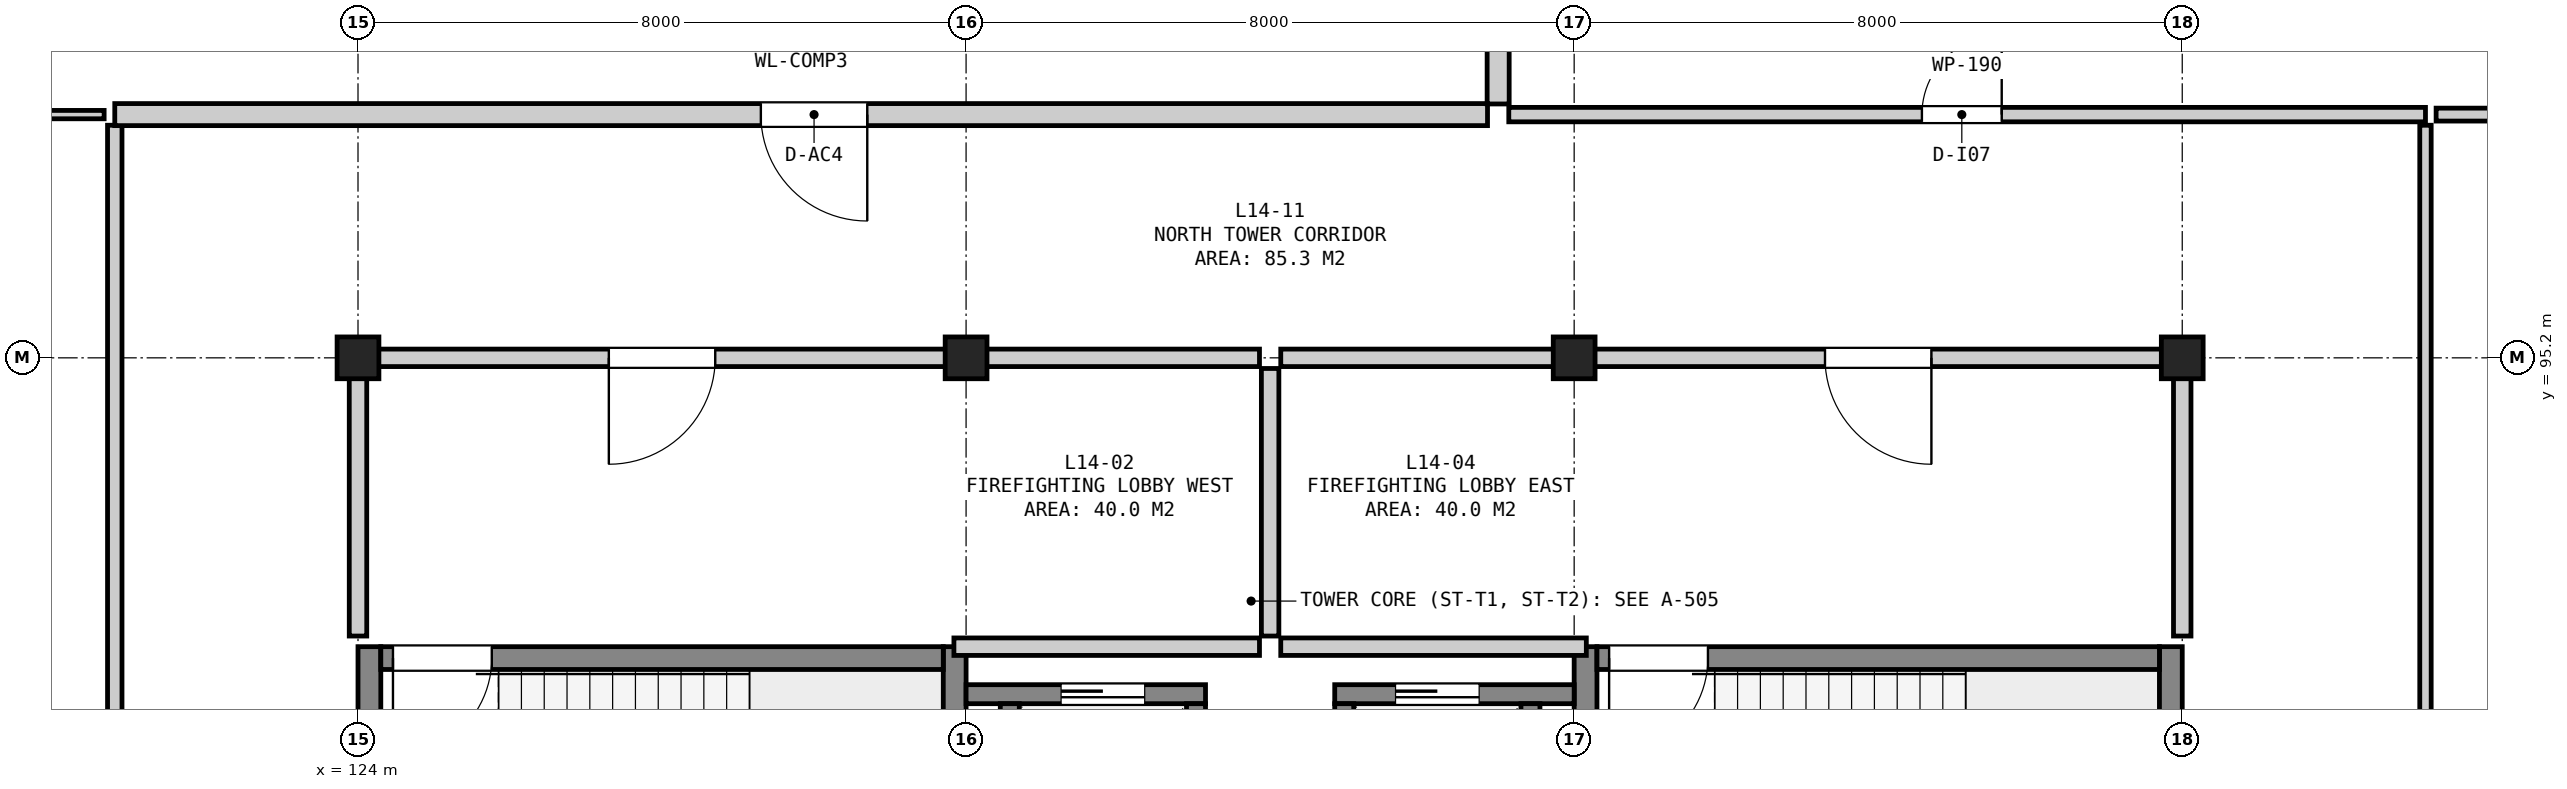
"""IFC4 building model, lengths in metres.
Left out: names, types, materials, properties, quantities, classifications, styles, units other than length and angle.
Written with IfcOpenShell. Run it as: python <this file> out.ifc"""

import sys

from ifc_helpers import new_model, si_unit, direction, frame, frame_2d, origin, origin_2d, place, context, subcontext, project, spatial, rectangle, extrude, element, fill, save


model = new_model("IFC4")
c1 = context("Model", 3, precision=1e-05, world=origin(), true_north=direction((0.0, 1.0)))
c2 = subcontext(c1, "Body", "Model", "MODEL_VIEW")
j1 = project(units=[si_unit("LENGTHUNIT", "METRE"), si_unit("PLANEANGLEUNIT", "RADIAN")], contexts=[c1])
p1 = place(None, origin())
s1 = spatial("IfcSite", under=j1, at=p1, CompositionType="ELEMENT")
p2 = place(p1, origin())
s2 = spatial("IfcBuilding", under=s1, at=p2, CompositionType="ELEMENT")
p3 = place(p2, frame((0.0, 0.0, 58.7)))
s3 = spatial("IfcBuildingStorey", under=s2, at=p3, CompositionType="ELEMENT", Elevation=58.7)
for number, where, z_axis, x_axis in (
    (1, (124.0, 95.2, 0.0), (0.0, 0.0, 1.0), (1.0, 0.0, 0.0)),
    (2, (132.0, 95.2, 0.0), (0.0, 0.0, 1.0), (1.0, 0.0, 0.0)),
    (3, (140.0, 95.2, 0.0), (0.0, 0.0, 1.0), (1.0, 0.0, 0.0)),
    (4, (148.0, 95.2, 0.0), (0.0, 0.0, 1.0), (1.0, 0.0, 0.0)),
):
    element("IfcColumn", number, at=place(p3, frame(where, z_axis=z_axis, x_axis=x_axis)), inside=s3, PredefinedType="COLUMN", context=c2, shape_type="SweptSolid", body=[
        extrude(rectangle(XDim=0.55, YDim=0.55, at=origin_2d()), origin(), (0.0, 0.0, 1.0), 3.95),
    ])
for number, where, z_axis, x_axis in (
    (5, (124.15, 87.2, 0.0), (0.0, 0.0, 1.0), (0.0, 1.0, 0.0)),
    (6, (131.85, 87.2, 0.0), (0.0, 0.0, 1.0), (0.0, 1.0, 0.0)),
):
    element("IfcWall", number, at=place(p3, frame(where, z_axis=z_axis, x_axis=x_axis)), inside=s3, PredefinedType="SHEAR", context=c2, shape_type="SweptSolid", body=[
        extrude(rectangle(XDim=4.2, YDim=0.3, at=frame_2d((2.1, 0.0))), origin(), (0.0, 0.0, 1.0), 3.67),
    ])
p4 = place(p3, frame((124.3, 91.25, 0.0), z_axis=(0.0, 0.0, 1.0), x_axis=(1.0, 0.0, 0.0)))
e7 = element("IfcWall", 7, at=p4, inside=s3, PredefinedType="SHEAR", context=c2, shape_type="SweptSolid", body=[
    extrude(rectangle(XDim=7.4, YDim=0.3, at=frame_2d((3.7, 0.0))), origin(), (0.0, 0.0, 1.0), 3.67),
])
p5 = place(p4, frame((0.16, 0.0, 0.0)))
e8 = element("IfcOpeningElement", 8, at=p5, cuts=e7, PredefinedType="OPENING", context=c2, shape_type="SweptSolid", body=[
    extrude(rectangle(XDim=1.3, YDim=2.18, at=frame_2d((0.65, 1.09))), frame((0.0, 0.162, 0.0), z_axis=(0.0, -1.0, 0.0), x_axis=(1.0, 0.0, 0.0)), (0.0, 0.0, 1.0), 0.324),
])
for number, where, z_axis, x_axis in (
    (9, (140.15, 87.2, 0.0), (0.0, 0.0, 1.0), (0.0, 1.0, 0.0)),
    (10, (147.85, 87.2, 0.0), (0.0, 0.0, 1.0), (0.0, 1.0, 0.0)),
):
    element("IfcWall", number, at=place(p3, frame(where, z_axis=z_axis, x_axis=x_axis)), inside=s3, PredefinedType="SHEAR", context=c2, shape_type="SweptSolid", body=[
        extrude(rectangle(XDim=4.2, YDim=0.3, at=frame_2d((2.1, 0.0))), origin(), (0.0, 0.0, 1.0), 3.67),
    ])
p6 = place(p3, frame((140.3, 91.25, 0.0), z_axis=(0.0, 0.0, 1.0), x_axis=(1.0, 0.0, 0.0)))
e11 = element("IfcWall", 11, at=p6, inside=s3, PredefinedType="SHEAR", context=c2, shape_type="SweptSolid", body=[
    extrude(rectangle(XDim=7.4, YDim=0.3, at=frame_2d((3.7, 0.0))), origin(), (0.0, 0.0, 1.0), 3.67),
])
p7 = place(p6, frame((0.16, 0.0, 0.0)))
e12 = element("IfcOpeningElement", 12, at=p7, cuts=e11, PredefinedType="OPENING", context=c2, shape_type="SweptSolid", body=[
    extrude(rectangle(XDim=1.3, YDim=2.18, at=frame_2d((0.65, 1.09))), frame((0.0, 0.162, 0.0), z_axis=(0.0, -1.0, 0.0), x_axis=(1.0, 0.0, 0.0)), (0.0, 0.0, 1.0), 0.324),
])
p8 = place(p3, frame((132.0, 90.775, 0.0), z_axis=(0.0, 0.0, 1.0), x_axis=(1.0, 0.0, 0.0)))
e13 = element("IfcWall", 13, at=p8, inside=s3, PredefinedType="SHEAR", context=c2, shape_type="SweptSolid", body=[
    extrude(rectangle(XDim=3.15, YDim=0.25, at=frame_2d((1.575, 0.0))), origin(), (0.0, 0.0, 1.0), 3.67),
])
p9 = place(p8, frame((1.25, 0.0, 0.0)))
e14 = element("IfcOpeningElement", 14, at=p9, cuts=e13, PredefinedType="OPENING", context=c2, shape_type="SweptSolid", body=[
    extrude(rectangle(XDim=1.1, YDim=2.15, at=frame_2d((0.55, 1.075))), frame((0.0, 0.137, 0.0), z_axis=(0.0, -1.0, 0.0), x_axis=(1.0, 0.0, 0.0)), (0.0, 0.0, 1.0), 0.274),
])
for number, where, z_axis, x_axis in (
    (15, (132.575, 87.75, 0.0), (0.0, 0.0, 1.0), (0.0, 1.0, 0.0)),
    (16, (135.025, 87.75, 0.0), (0.0, 0.0, 1.0), (0.0, 1.0, 0.0)),
):
    element("IfcWall", number, at=place(p3, frame(where, z_axis=z_axis, x_axis=x_axis)), inside=s3, PredefinedType="SHEAR", context=c2, shape_type="SweptSolid", body=[
        extrude(rectangle(XDim=2.9, YDim=0.25, at=frame_2d((1.45, 0.0))), origin(), (0.0, 0.0, 1.0), 3.67),
    ])
p10 = place(p3, frame((136.85, 90.775, 0.0), z_axis=(0.0, 0.0, 1.0), x_axis=(1.0, 0.0, 0.0)))
e17 = element("IfcWall", 17, at=p10, inside=s3, PredefinedType="SHEAR", context=c2, shape_type="SweptSolid", body=[
    extrude(rectangle(XDim=3.15, YDim=0.25, at=frame_2d((1.575, 0.0))), origin(), (0.0, 0.0, 1.0), 3.67),
])
p11 = place(p10, frame((0.8, 0.0, 0.0)))
e18 = element("IfcOpeningElement", 18, at=p11, cuts=e17, PredefinedType="OPENING", context=c2, shape_type="SweptSolid", body=[
    extrude(rectangle(XDim=1.1, YDim=2.15, at=frame_2d((0.55, 1.075))), frame((0.0, 0.137, 0.0), z_axis=(0.0, -1.0, 0.0), x_axis=(1.0, 0.0, 0.0)), (0.0, 0.0, 1.0), 0.274),
])
for number, where, z_axis, x_axis in (
    (19, (136.975, 87.75, 0.0), (0.0, 0.0, 1.0), (0.0, 1.0, 0.0)),
    (20, (139.425, 87.75, 0.0), (0.0, 0.0, 1.0), (0.0, 1.0, 0.0)),
):
    element("IfcWall", number, at=place(p3, frame(where, z_axis=z_axis, x_axis=x_axis)), inside=s3, PredefinedType="SHEAR", context=c2, shape_type="SweptSolid", body=[
        extrude(rectangle(XDim=2.9, YDim=0.25, at=frame_2d((1.45, 0.0))), origin(), (0.0, 0.0, 1.0), 3.67),
    ])
p12 = place(p3, frame((131.84, 91.4, 0.0), z_axis=(0.0, 0.0, 1.0), x_axis=(1.0, 0.0, 0.0)))
e21 = element("IfcWall", 21, at=p12, inside=s3, PredefinedType="SOLIDWALL", context=c2, shape_type="SweptSolid", body=[
    extrude(rectangle(XDim=4.02, YDim=0.23, at=frame_2d((2.01, 0.0))), origin(), (0.0, 0.0, 1.0), 3.67),
])
p13 = place(p3, frame((124.14, 95.2, 0.0), z_axis=(0.0, 0.0, 1.0), x_axis=(1.0, 0.0, 0.0)))
e22 = element("IfcWall", 22, at=p13, inside=s3, PredefinedType="SOLIDWALL", context=c2, shape_type="SweptSolid", body=[
    extrude(rectangle(XDim=11.72, YDim=0.23, at=frame_2d((5.86, 0.0))), origin(), (0.0, 0.0, 1.0), 3.045),
])
p14 = place(p13, frame((3.16, 0.0, 0.0)))
e23 = element("IfcOpeningElement", 23, at=p14, cuts=e22, PredefinedType="OPENING", context=c2, shape_type="SweptSolid", body=[
    extrude(rectangle(XDim=1.4, YDim=2.2, at=frame_2d((0.7, 1.1))), frame((0.0, 0.127, 0.0), z_axis=(0.0, -1.0, 0.0), x_axis=(1.0, 0.0, 0.0)), (0.0, 0.0, 1.0), 0.254),
])
p15 = place(p3, frame((124.0, 91.54, 0.0), z_axis=(0.0, 0.0, 1.0), x_axis=(0.0, 1.0, 0.0)))
e24 = element("IfcWall", 24, at=p15, inside=s3, PredefinedType="SOLIDWALL", context=c2, shape_type="SweptSolid", body=[
    extrude(rectangle(XDim=3.52, YDim=0.23, at=frame_2d((1.76, 0.0))), origin(), (0.0, 0.0, 1.0), 3.095),
])
p16 = place(p3, frame((136.0, 91.54, 0.0), z_axis=(0.0, 0.0, 1.0), x_axis=(0.0, 1.0, 0.0)))
e25 = element("IfcWall", 25, at=p16, inside=s3, PredefinedType="SOLIDWALL", context=c2, shape_type="SweptSolid", body=[
    extrude(rectangle(XDim=3.52, YDim=0.23, at=frame_2d((1.76, 0.0))), origin(), (0.0, 0.0, 1.0), 3.67),
])
p17 = place(p3, frame((136.14, 91.4, 0.0), z_axis=(0.0, 0.0, 1.0), x_axis=(1.0, 0.0, 0.0)))
e26 = element("IfcWall", 26, at=p17, inside=s3, PredefinedType="SOLIDWALL", context=c2, shape_type="SweptSolid", body=[
    extrude(rectangle(XDim=4.02, YDim=0.23, at=frame_2d((2.01, 0.0))), origin(), (0.0, 0.0, 1.0), 3.67),
])
p18 = place(p3, frame((136.14, 95.2, 0.0), z_axis=(0.0, 0.0, 1.0), x_axis=(1.0, 0.0, 0.0)))
e27 = element("IfcWall", 27, at=p18, inside=s3, PredefinedType="SOLIDWALL", context=c2, shape_type="SweptSolid", body=[
    extrude(rectangle(XDim=11.72, YDim=0.23, at=frame_2d((5.86, 0.0))), origin(), (0.0, 0.0, 1.0), 3.095),
])
p19 = place(p18, frame((7.16, 0.0, 0.0)))
e28 = element("IfcOpeningElement", 28, at=p19, cuts=e27, PredefinedType="OPENING", context=c2, shape_type="SweptSolid", body=[
    extrude(rectangle(XDim=1.4, YDim=2.2, at=frame_2d((0.7, 1.1))), frame((0.0, 0.127, 0.0), z_axis=(0.0, -1.0, 0.0), x_axis=(1.0, 0.0, 0.0)), (0.0, 0.0, 1.0), 0.254),
])
p20 = place(p3, frame((148.0, 91.54, 0.0), z_axis=(0.0, 0.0, 1.0), x_axis=(0.0, 1.0, 0.0)))
e29 = element("IfcWall", 29, at=p20, inside=s3, PredefinedType="SOLIDWALL", context=c2, shape_type="SweptSolid", body=[
    extrude(rectangle(XDim=3.52, YDim=0.23, at=frame_2d((1.76, 0.0))), origin(), (0.0, 0.0, 1.0), 2.795),
])
p21 = place(p3, frame((151.34, 98.4, 0.0), z_axis=(0.0, 0.0, 1.0), x_axis=(1.0, 0.0, 0.0)))
e30 = element("IfcWall", 30, at=p21, inside=s3, PredefinedType="PARTITIONING", context=c2, shape_type="SweptSolid", body=[
    extrude(rectangle(XDim=16.565, YDim=0.17, at=frame_2d((8.282, 0.0))), origin(), (0.0, 0.0, 1.0), 3.67),
])
p22 = place(p3, frame((151.2, 76.0, 0.0), z_axis=(0.0, 0.0, 1.0), x_axis=(0.0, 1.0, 0.0)))
e31 = element("IfcWall", 31, at=p22, inside=s3, PredefinedType="PARTITIONING", context=c2, shape_type="SweptSolid", body=[
    extrude(rectangle(XDim=22.26, YDim=0.15, at=frame_2d((11.13, 0.0))), origin(), (0.0, 0.0, 1.0), 3.67),
])
p23 = place(p22, frame((6.675, 0.0, 0.0)))
e32 = element("IfcOpeningElement", 32, at=p23, cuts=e31, PredefinedType="OPENING", context=c2, shape_type="SweptSolid", body=[
    extrude(rectangle(XDim=1.05, YDim=2.15, at=frame_2d((0.525, 1.075))), frame((0.0, 0.087, 0.0), z_axis=(0.0, -1.0, 0.0), x_axis=(1.0, 0.0, 0.0)), (0.0, 0.0, 1.0), 0.174),
])
p24 = place(p3, frame((116.895, 98.4, 0.0), z_axis=(0.0, 0.0, 1.0), x_axis=(1.0, 0.0, 0.0)))
e33 = element("IfcWall", 33, at=p24, inside=s3, PredefinedType="PARTITIONING", context=c2, shape_type="SweptSolid", body=[
    extrude(rectangle(XDim=3.765, YDim=0.11, at=frame_2d((1.882, 0.0))), origin(), (0.0, 0.0, 1.0), 3.67),
])
p25 = place(p3, frame((120.8, 76.14, 0.0), z_axis=(0.0, 0.0, 1.0), x_axis=(0.0, 1.0, 0.0)))
e34 = element("IfcWall", 34, at=p25, inside=s3, PredefinedType="PARTITIONING", context=c2, shape_type="SweptSolid", body=[
    extrude(rectangle(XDim=22.12, YDim=0.19, at=frame_2d((11.06, 0.0))), origin(), (0.0, 0.0, 1.0), 3.67),
])
p26 = place(p25, frame((6.535, 0.0, 0.0)))
e35 = element("IfcOpeningElement", 35, at=p26, cuts=e34, PredefinedType="OPENING", context=c2, shape_type="SweptSolid", body=[
    extrude(rectangle(XDim=1.05, YDim=2.15, at=frame_2d((0.525, 1.075))), frame((0.0, 0.107, 0.0), z_axis=(0.0, -1.0, 0.0), x_axis=(1.0, 0.0, 0.0)), (0.0, 0.0, 1.0), 0.214),
])
p27 = place(p3, frame((120.8, 98.4, 0.0), z_axis=(0.0, 0.0, 1.0), x_axis=(1.0, 0.0, 0.0)))
e36 = element("IfcWall", 36, at=p27, inside=s3, PredefinedType="SOLIDWALL", context=c2, shape_type="SweptSolid", body=[
    extrude(rectangle(XDim=18.06, YDim=0.29, at=frame_2d((9.03, 0.0))), origin(), (0.0, 0.0, 1.0), 3.67),
])
p28 = place(p27, frame((8.5, 0.0, 0.0)))
e37 = element("IfcOpeningElement", 37, at=p28, cuts=e36, PredefinedType="OPENING", context=c2, shape_type="SweptSolid", body=[
    extrude(rectangle(XDim=1.4, YDim=2.2, at=frame_2d((0.7, 1.1))), frame((0.0, 0.157, 0.0), z_axis=(0.0, -1.0, 0.0), x_axis=(1.0, 0.0, 0.0)), (0.0, 0.0, 1.0), 0.314),
])
p29 = place(p3, frame((139.0, 98.54, 0.0), z_axis=(0.0, 0.0, 1.0), x_axis=(0.0, 1.0, 0.0)))
e38 = element("IfcWall", 38, at=p29, inside=s3, PredefinedType="SOLIDWALL", context=c2, shape_type="SweptSolid", body=[
    extrude(rectangle(XDim=16.475, YDim=0.29, at=frame_2d((8.237, 0.0))), origin(), (0.0, 0.0, 1.0), 3.67),
])
p30 = place(p3, frame((139.14, 98.4, 0.0), z_axis=(0.0, 0.0, 1.0), x_axis=(1.0, 0.0, 0.0)))
e39 = element("IfcWall", 39, at=p30, inside=s3, PredefinedType="PARTITIONING", context=c2, shape_type="SweptSolid", body=[
    extrude(rectangle(XDim=12.06, YDim=0.19, at=frame_2d((6.03, 0.0))), origin(), (0.0, 0.0, 1.0), 3.67),
])
p31 = place(p30, frame((5.435, 0.0, 0.0)))
e40 = element("IfcOpeningElement", 40, at=p31, cuts=e39, PredefinedType="OPENING", context=c2, shape_type="SweptSolid", body=[
    extrude(rectangle(XDim=1.05, YDim=2.15, at=frame_2d((0.525, 1.075))), frame((0.0, 0.107, 0.0), z_axis=(0.0, -1.0, 0.0), x_axis=(1.0, 0.0, 0.0)), (0.0, 0.0, 1.0), 0.214),
])
p32 = place(p5, frame((1.3, 0.0, 0.0), z_axis=(0.0, 0.0, 1.0), x_axis=(-1.0, 0.0, 0.0)))
e41 = element("IfcDoor", 41, at=p32, inside=s3, OperationType="SINGLE_SWING_RIGHT", PredefinedType="DOOR", context=c2, shape_type="SweptSolid", body=[
    extrude(rectangle(XDim=1.3, YDim=2.18, at=frame_2d((0.65, 1.09))), frame((0.0, 0.025, 0.0), z_axis=(0.0, -1.0, 0.0), x_axis=(1.0, 0.0, 0.0)), (0.0, 0.0, 1.0), 0.05),
])
fill(e8, e41)
p33 = place(p7, frame((1.3, 0.0, 0.0), z_axis=(0.0, 0.0, 1.0), x_axis=(-1.0, 0.0, 0.0)))
e42 = element("IfcDoor", 42, at=p33, inside=s3, OperationType="SINGLE_SWING_RIGHT", PredefinedType="DOOR", context=c2, shape_type="SweptSolid", body=[
    extrude(rectangle(XDim=1.3, YDim=2.18, at=frame_2d((0.65, 1.09))), frame((0.0, 0.025, 0.0), z_axis=(0.0, -1.0, 0.0), x_axis=(1.0, 0.0, 0.0)), (0.0, 0.0, 1.0), 0.05),
])
fill(e12, e42)
p34 = place(p9, origin())
e43 = element("IfcDoor", 43, at=p34, inside=s3, OperationType="SLIDING_TO_LEFT", PredefinedType="DOOR", context=c2, shape_type="SweptSolid", body=[
    extrude(rectangle(XDim=1.1, YDim=2.15, at=frame_2d((0.55, 1.075))), frame((0.0, 0.025, 0.0), z_axis=(0.0, -1.0, 0.0), x_axis=(1.0, 0.0, 0.0)), (0.0, 0.0, 1.0), 0.05),
])
fill(e14, e43)
p35 = place(p11, origin())
e44 = element("IfcDoor", 44, at=p35, inside=s3, OperationType="SLIDING_TO_LEFT", PredefinedType="DOOR", context=c2, shape_type="SweptSolid", body=[
    extrude(rectangle(XDim=1.1, YDim=2.15, at=frame_2d((0.55, 1.075))), frame((0.0, 0.025, 0.0), z_axis=(0.0, -1.0, 0.0), x_axis=(1.0, 0.0, 0.0)), (0.0, 0.0, 1.0), 0.05),
])
fill(e18, e44)
p36 = place(p14, frame((1.4, 0.0, 0.0), z_axis=(0.0, 0.0, 1.0), x_axis=(-1.0, 0.0, 0.0)))
e45 = element("IfcDoor", 45, at=p36, inside=s3, OperationType="SINGLE_SWING_RIGHT", PredefinedType="DOOR", context=c2, shape_type="SweptSolid", body=[
    extrude(rectangle(XDim=1.4, YDim=2.2, at=frame_2d((0.7, 1.1))), frame((0.0, 0.025, 0.0), z_axis=(0.0, -1.0, 0.0), x_axis=(1.0, 0.0, 0.0)), (0.0, 0.0, 1.0), 0.05),
])
fill(e23, e45)
p37 = place(p19, frame((1.4, 0.0, 0.0), z_axis=(0.0, 0.0, 1.0), x_axis=(-1.0, 0.0, 0.0)))
e46 = element("IfcDoor", 46, at=p37, inside=s3, OperationType="SINGLE_SWING_LEFT", PredefinedType="DOOR", context=c2, shape_type="SweptSolid", body=[
    extrude(rectangle(XDim=1.4, YDim=2.2, at=frame_2d((0.7, 1.1))), frame((0.0, 0.025, 0.0), z_axis=(0.0, -1.0, 0.0), x_axis=(1.0, 0.0, 0.0)), (0.0, 0.0, 1.0), 0.05),
])
fill(e28, e46)
p38 = place(p28, frame((1.4, 0.0, 0.0), z_axis=(0.0, 0.0, 1.0), x_axis=(-1.0, 0.0, 0.0)))
e47 = element("IfcDoor", 47, at=p38, inside=s3, OperationType="SINGLE_SWING_LEFT", PredefinedType="DOOR", context=c2, shape_type="SweptSolid", body=[
    extrude(rectangle(XDim=1.4, YDim=2.2, at=frame_2d((0.7, 1.1))), frame((0.0, 0.025, 0.0), z_axis=(0.0, -1.0, 0.0), x_axis=(1.0, 0.0, 0.0)), (0.0, 0.0, 1.0), 0.05),
])
fill(e37, e47)
p39 = place(p31, origin())
e48 = element("IfcDoor", 48, at=p39, inside=s3, OperationType="SINGLE_SWING_RIGHT", PredefinedType="DOOR", context=c2, shape_type="SweptSolid", body=[
    extrude(rectangle(XDim=1.05, YDim=2.15, at=frame_2d((0.525, 1.075))), frame((0.0, 0.025, 0.0), z_axis=(0.0, -1.0, 0.0), x_axis=(1.0, 0.0, 0.0)), (0.0, 0.0, 1.0), 0.05),
])
fill(e40, e48)
save(model, sys.argv[1])
